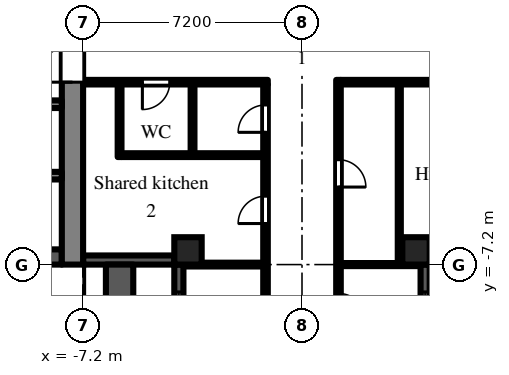
"""IFC4 building model, lengths in metres.
Left out: names, types, materials, properties, quantities, classifications, styles, units other than length and angle.
Written with IfcOpenShell. Run it as: python <this file> out.ifc"""

import sys

from ifc_helpers import new_model, si_unit, direction, frame, frame_2d, origin, origin_2d, place, context, subcontext, project, spatial, rectangle, extrude, element, fill, save


model = new_model("IFC4")
c1 = context("Model", 3, precision=1e-05, world=origin(), true_north=direction((0.0, 1.0)))
c2 = subcontext(c1, "Body", "Model", "MODEL_VIEW")
j1 = project(units=[si_unit("LENGTHUNIT", "METRE"), si_unit("PLANEANGLEUNIT", "RADIAN")], contexts=[c1])
p1 = place(None, origin())
s1 = spatial("IfcSite", under=j1, at=p1, CompositionType="ELEMENT")
p2 = place(p1, origin())
s2 = spatial("IfcBuilding", under=s1, at=p2, CompositionType="ELEMENT")
p3 = place(p2, frame((0.0, 0.0, 35.7)))
s3 = spatial("IfcBuildingStorey", under=s2, at=p3, CompositionType="ELEMENT", Elevation=35.7)
for number, where, z_axis, x_axis in (
    (1, (-3.75, -6.75, 0.0), (0.0, 0.0, 1.0), (1.0, 0.0, 0.0)),
    (2, (3.75, -6.75, 0.0), (0.0, 0.0, 1.0), (1.0, 0.0, 0.0)),
):
    element("IfcColumn", number, at=place(p3, frame(where, z_axis=z_axis, x_axis=x_axis)), inside=s3, PredefinedType="COLUMN", context=c2, shape_type="SweptSolid", body=[
        extrude(rectangle(XDim=0.9, YDim=0.9, at=origin_2d()), origin(), (0.0, 0.0, 1.0), 3.0),
    ])
p4 = place(p3, frame((-7.2, -7.05, 0.0), z_axis=(0.0, 0.0, 1.0), x_axis=(1.0, 0.0, 0.0)))
e3 = element("IfcWall", 3, at=p4, inside=s3, PredefinedType="SOLIDWALL", context=c2, shape_type="SweptSolid", body=[
    extrude(rectangle(XDim=3.0, YDim=0.3, at=frame_2d((1.5, 0.0))), origin(), (0.0, 0.0, 1.0), 2.1),
])
p5 = place(p3, frame((-4.05, -7.2, 0.0), z_axis=(0.0, 0.0, 1.0), x_axis=(0.0, -1.0, 0.0)))
e4 = element("IfcWall", 4, at=p5, inside=s3, PredefinedType="SOLIDWALL", context=c2, shape_type="SweptSolid", body=[
    extrude(rectangle(XDim=7.2, YDim=0.3, at=frame_2d((3.6, 0.0))), origin(), (0.0, 0.0, 1.0), 2.1),
])
p6 = place(p5, frame((3.0, 0.0, 0.0)))
e5 = element("IfcOpeningElement", 5, at=p6, cuts=e4, PredefinedType="OPENING", context=c2, shape_type="SweptSolid", body=[
    extrude(rectangle(XDim=1.2, YDim=2.05, at=frame_2d((0.6, 1.025))), frame((0.0, 0.16, 0.0), z_axis=(0.0, -1.0, 0.0), x_axis=(1.0, 0.0, 0.0)), (0.0, 0.0, 1.0), 0.32),
])
p7 = place(p5, frame((0.9, 0.0, 0.2)))
e6 = element("IfcOpeningElement", 6, at=p7, cuts=e4, PredefinedType="OPENING", context=c2, shape_type="SweptSolid", body=[
    extrude(rectangle(XDim=1.8, YDim=1.85, at=frame_2d((0.9, 0.925))), frame((0.0, 0.16, 0.0), z_axis=(0.0, -1.0, 0.0), x_axis=(1.0, 0.0, 0.0)), (0.0, 0.0, 1.0), 0.32),
])
p8 = place(p5, frame((4.5, 0.0, 0.2)))
e7 = element("IfcOpeningElement", 7, at=p8, cuts=e4, PredefinedType="OPENING", context=c2, shape_type="SweptSolid", body=[
    extrude(rectangle(XDim=1.8, YDim=1.85, at=frame_2d((0.9, 0.925))), frame((0.0, 0.16, 0.0), z_axis=(0.0, -1.0, 0.0), x_axis=(1.0, 0.0, 0.0)), (0.0, 0.0, 1.0), 0.32),
])
p9 = place(p3, frame((4.05, -14.4, 0.0), z_axis=(0.0, 0.0, 1.0), x_axis=(0.0, 1.0, 0.0)))
e8 = element("IfcWall", 8, at=p9, inside=s3, PredefinedType="SOLIDWALL", context=c2, shape_type="SweptSolid", body=[
    extrude(rectangle(XDim=7.2, YDim=0.3, at=frame_2d((3.6, 0.0))), origin(), (0.0, 0.0, 1.0), 2.1),
])
p10 = place(p9, frame((3.0, 0.0, 0.0)))
e9 = element("IfcOpeningElement", 9, at=p10, cuts=e8, PredefinedType="OPENING", context=c2, shape_type="SweptSolid", body=[
    extrude(rectangle(XDim=1.2, YDim=2.05, at=frame_2d((0.6, 1.025))), frame((0.0, 0.16, 0.0), z_axis=(0.0, -1.0, 0.0), x_axis=(1.0, 0.0, 0.0)), (0.0, 0.0, 1.0), 0.32),
])
p11 = place(p9, frame((0.9, 0.0, 0.2)))
e10 = element("IfcOpeningElement", 10, at=p11, cuts=e8, PredefinedType="OPENING", context=c2, shape_type="SweptSolid", body=[
    extrude(rectangle(XDim=1.8, YDim=1.85, at=frame_2d((0.9, 0.925))), frame((0.0, 0.16, 0.0), z_axis=(0.0, -1.0, 0.0), x_axis=(1.0, 0.0, 0.0)), (0.0, 0.0, 1.0), 0.32),
])
p12 = place(p9, frame((4.5, 0.0, 0.2)))
e11 = element("IfcOpeningElement", 11, at=p12, cuts=e8, PredefinedType="OPENING", context=c2, shape_type="SweptSolid", body=[
    extrude(rectangle(XDim=1.8, YDim=1.85, at=frame_2d((0.9, 0.925))), frame((0.0, 0.16, 0.0), z_axis=(0.0, -1.0, 0.0), x_axis=(1.0, 0.0, 0.0)), (0.0, 0.0, 1.0), 0.32),
])
p13 = place(p3, frame((-6.0, -14.4, 0.0), z_axis=(0.0, 0.0, 1.0), x_axis=(0.0, 1.0, 0.0)))
e12 = element("IfcWall", 12, at=p13, inside=s3, PredefinedType="PARAPET", context=c2, shape_type="SweptSolid", body=[
    extrude(rectangle(XDim=7.2, YDim=0.9, at=frame_2d((3.6, 0.0))), origin(), (0.0, 0.0, 1.0), 0.8),
])
p14 = place(p3, frame((-7.55, -7.2, 0.0), z_axis=(0.0, 0.0, 1.0), x_axis=(0.0, 1.0, 0.0)))
e13 = element("IfcWall", 13, at=p14, inside=s3, PredefinedType="SHEAR", context=c2, shape_type="SweptSolid", body=[
    extrude(rectangle(XDim=14.4, YDim=0.7, at=frame_2d((7.2, 0.0))), origin(), (0.0, 0.0, 1.0), 2.575),
])
p15 = place(p14, frame((6.0, 0.0, 0.0)))
e14 = element("IfcOpeningElement", 14, at=p15, cuts=e13, PredefinedType="OPENING", context=c2, shape_type="SweptSolid", body=[
    extrude(rectangle(XDim=2.4, YDim=2.2, at=frame_2d((1.2, 1.1))), frame((0.0, 0.36, 0.0), z_axis=(0.0, -1.0, 0.0), x_axis=(1.0, 0.0, 0.0)), (0.0, 0.0, 1.0), 0.72),
])
p16 = place(p3, frame((-7.9, -6.95, 0.0), z_axis=(0.0, 0.0, 1.0), x_axis=(-1.0, 0.0, 0.0)))
e15 = element("IfcWall", 15, at=p16, inside=s3, PredefinedType="SHEAR", context=c2, shape_type="SweptSolid", body=[
    extrude(rectangle(XDim=12.95, YDim=0.5, at=frame_2d((6.475, 0.0))), origin(), (0.0, 0.0, 1.0), 2.575),
])
p17 = place(p3, frame((-7.9, -1.925, 0.0), z_axis=(0.0, 0.0, 1.0), x_axis=(-1.0, 0.0, 0.0)))
e16 = element("IfcWall", 16, at=p17, inside=s3, PredefinedType="SHEAR", context=c2, shape_type="SweptSolid", body=[
    extrude(rectangle(XDim=12.95, YDim=0.25, at=frame_2d((6.475, 0.0))), origin(), (0.0, 0.0, 1.0), 2.575),
])
p18 = place(p17, frame((4.825, 0.0, 0.0)))
e17 = element("IfcOpeningElement", 17, at=p18, cuts=e16, PredefinedType="OPENING", context=c2, shape_type="SweptSolid", body=[
    extrude(rectangle(XDim=1.1, YDim=2.1, at=frame_2d((0.55, 1.05))), frame((0.0, 0.135, 0.0), z_axis=(0.0, -1.0, 0.0), x_axis=(1.0, 0.0, 0.0)), (0.0, 0.0, 1.0), 0.27),
])
p19 = place(p17, frame((7.025, 0.0, 0.0)))
e18 = element("IfcOpeningElement", 18, at=p19, cuts=e16, PredefinedType="OPENING", context=c2, shape_type="SweptSolid", body=[
    extrude(rectangle(XDim=1.1, YDim=2.1, at=frame_2d((0.55, 1.05))), frame((0.0, 0.135, 0.0), z_axis=(0.0, -1.0, 0.0), x_axis=(1.0, 0.0, 0.0)), (0.0, 0.0, 1.0), 0.27),
])
p20 = place(p17, frame((9.225, 0.0, 0.0)))
e19 = element("IfcOpeningElement", 19, at=p20, cuts=e16, PredefinedType="OPENING", context=c2, shape_type="SweptSolid", body=[
    extrude(rectangle(XDim=1.1, YDim=2.1, at=frame_2d((0.55, 1.05))), frame((0.0, 0.135, 0.0), z_axis=(0.0, -1.0, 0.0), x_axis=(1.0, 0.0, 0.0)), (0.0, 0.0, 1.0), 0.27),
])
p21 = place(p17, frame((0.525, 0.0, 0.0)))
e20 = element("IfcOpeningElement", 20, at=p21, cuts=e16, PredefinedType="OPENING", context=c2, shape_type="SweptSolid", body=[
    extrude(rectangle(XDim=0.9, YDim=2.1, at=frame_2d((0.45, 1.05))), frame((0.0, 0.135, 0.0), z_axis=(0.0, -1.0, 0.0), x_axis=(1.0, 0.0, 0.0)), (0.0, 0.0, 1.0), 0.27),
])
p22 = place(p17, frame((2.625, 0.0, 0.0)))
e21 = element("IfcOpeningElement", 21, at=p22, cuts=e16, PredefinedType="OPENING", context=c2, shape_type="SweptSolid", body=[
    extrude(rectangle(XDim=1.1, YDim=2.1, at=frame_2d((0.55, 1.05))), frame((0.0, 0.135, 0.0), z_axis=(0.0, -1.0, 0.0), x_axis=(1.0, 0.0, 0.0)), (0.0, 0.0, 1.0), 0.27),
])
p23 = place(p3, frame((-7.9, -4.275, 0.0), z_axis=(0.0, 0.0, 1.0), x_axis=(-1.0, 0.0, 0.0)))
e22 = element("IfcWall", 22, at=p23, inside=s3, PredefinedType="SHEAR", context=c2, shape_type="SweptSolid", body=[
    extrude(rectangle(XDim=1.95, YDim=0.25, at=frame_2d((0.975, 0.0))), origin(), (0.0, 0.0, 1.0), 2.575),
])
p24 = place(p3, frame((-7.2, -1.2, 0.0), z_axis=(0.0, 0.0, 1.0), x_axis=(1.0, 0.0, 0.0)))
e23 = element("IfcWall", 23, at=p24, inside=s3, PredefinedType="PARTITIONING", context=c2, shape_type="SweptSolid", body=[
    extrude(rectangle(XDim=6.075, YDim=0.15, at=frame_2d((3.038, 0.0))), origin(), (0.0, 0.0, 1.0), 2.575),
])
p25 = place(p24, frame((1.95, 0.0, 0.0)))
e24 = element("IfcOpeningElement", 24, at=p25, cuts=e23, PredefinedType="OPENING", context=c2, shape_type="SweptSolid", body=[
    extrude(rectangle(XDim=0.9, YDim=2.1, at=frame_2d((0.45, 1.05))), frame((0.0, 0.085, 0.0), z_axis=(0.0, -1.0, 0.0), x_axis=(1.0, 0.0, 0.0)), (0.0, 0.0, 1.0), 0.17),
])
p26 = place(p3, frame((-6.0, -3.663, 0.0), z_axis=(0.0, 0.0, 1.0), x_axis=(0.0, 1.0, 0.0)))
e25 = element("IfcWall", 25, at=p26, inside=s3, PredefinedType="PARTITIONING", context=c2, shape_type="SweptSolid", body=[
    extrude(rectangle(XDim=2.388, YDim=0.125, at=frame_2d((1.194, 0.0))), origin(), (0.0, 0.0, 1.0), 2.575),
])
p27 = place(p3, frame((-5.938, -3.6, 0.0), z_axis=(0.0, 0.0, 1.0), x_axis=(1.0, 0.0, 0.0)))
e26 = element("IfcWall", 26, at=p27, inside=s3, PredefinedType="PARTITIONING", context=c2, shape_type="SweptSolid", body=[
    extrude(rectangle(XDim=4.663, YDim=0.125, at=frame_2d((2.331, 0.0))), origin(), (0.0, 0.0, 1.0), 2.575),
])
p28 = place(p3, frame((-3.9, -7.2, 0.0), z_axis=(0.0, 0.0, 1.0), x_axis=(1.0, 0.0, 0.0)))
e27 = element("IfcWall", 27, at=p28, inside=s3, PredefinedType="PARTITIONING", context=c2, shape_type="SweptSolid", body=[
    extrude(rectangle(XDim=2.625, YDim=0.125, at=frame_2d((1.312, 0.0))), origin(), (0.0, 0.0, 1.0), 2.575),
])
p29 = place(p3, frame((-3.6, -3.538, 0.0), z_axis=(0.0, 0.0, 1.0), x_axis=(0.0, 1.0, 0.0)))
e28 = element("IfcWall", 28, at=p29, inside=s3, PredefinedType="PARTITIONING", context=c2, shape_type="SweptSolid", body=[
    extrude(rectangle(XDim=2.263, YDim=0.125, at=frame_2d((1.131, 0.0))), origin(), (0.0, 0.0, 1.0), 2.575),
])
p30 = place(p3, frame((-1.2, -36.5, 0.0), z_axis=(0.0, 0.0, 1.0), x_axis=(0.0, 1.0, 0.0)))
e29 = element("IfcWall", 29, at=p30, inside=s3, PredefinedType="PARTITIONING", context=c2, shape_type="SweptSolid", body=[
    extrude(rectangle(XDim=35.225, YDim=0.15, at=frame_2d((17.613, 0.0))), origin(), (0.0, 0.0, 1.0), 2.575),
])
p31 = place(p30, frame((33.65, 0.0, 0.0)))
e30 = element("IfcOpeningElement", 30, at=p31, cuts=e29, PredefinedType="OPENING", context=c2, shape_type="SweptSolid", body=[
    extrude(rectangle(XDim=0.9, YDim=2.1, at=frame_2d((0.45, 1.05))), frame((0.0, 0.085, 0.0), z_axis=(0.0, -1.0, 0.0), x_axis=(1.0, 0.0, 0.0)), (0.0, 0.0, 1.0), 0.17),
])
p32 = place(p30, frame((30.65, 0.0, 0.0)))
e31 = element("IfcOpeningElement", 31, at=p32, cuts=e29, PredefinedType="OPENING", context=c2, shape_type="SweptSolid", body=[
    extrude(rectangle(XDim=0.9, YDim=2.1, at=frame_2d((0.45, 1.05))), frame((0.0, 0.085, 0.0), z_axis=(0.0, -1.0, 0.0), x_axis=(1.0, 0.0, 0.0)), (0.0, 0.0, 1.0), 0.17),
])
p33 = place(p30, frame((23.05, 0.0, 0.0)))
e32 = element("IfcOpeningElement", 32, at=p33, cuts=e29, PredefinedType="OPENING", context=c2, shape_type="SweptSolid", body=[
    extrude(rectangle(XDim=0.9, YDim=2.1, at=frame_2d((0.45, 1.05))), frame((0.0, 0.085, 0.0), z_axis=(0.0, -1.0, 0.0), x_axis=(1.0, 0.0, 0.0)), (0.0, 0.0, 1.0), 0.17),
])
p34 = place(p30, frame((26.65, 0.0, 0.0)))
e33 = element("IfcOpeningElement", 33, at=p34, cuts=e29, PredefinedType="OPENING", context=c2, shape_type="SweptSolid", body=[
    extrude(rectangle(XDim=0.9, YDim=2.1, at=frame_2d((0.45, 1.05))), frame((0.0, 0.085, 0.0), z_axis=(0.0, -1.0, 0.0), x_axis=(1.0, 0.0, 0.0)), (0.0, 0.0, 1.0), 0.17),
])
p35 = place(p30, frame((17.3, 0.0, 0.0)))
e34 = element("IfcOpeningElement", 34, at=p35, cuts=e29, PredefinedType="OPENING", context=c2, shape_type="SweptSolid", body=[
    extrude(rectangle(XDim=1.0, YDim=2.1, at=frame_2d((0.5, 1.05))), frame((0.0, 0.085, 0.0), z_axis=(0.0, -1.0, 0.0), x_axis=(1.0, 0.0, 0.0)), (0.0, 0.0, 1.0), 0.17),
])
p36 = place(p30, frame((12.65, 0.0, 0.0)))
e35 = element("IfcOpeningElement", 35, at=p36, cuts=e29, PredefinedType="OPENING", context=c2, shape_type="SweptSolid", body=[
    extrude(rectangle(XDim=0.9, YDim=2.1, at=frame_2d((0.45, 1.05))), frame((0.0, 0.085, 0.0), z_axis=(0.0, -1.0, 0.0), x_axis=(1.0, 0.0, 0.0)), (0.0, 0.0, 1.0), 0.17),
])
p37 = place(p30, frame((10.1, 0.0, 0.0)))
e36 = element("IfcOpeningElement", 36, at=p37, cuts=e29, PredefinedType="OPENING", context=c2, shape_type="SweptSolid", body=[
    extrude(rectangle(XDim=1.0, YDim=2.1, at=frame_2d((0.5, 1.05))), frame((0.0, 0.085, 0.0), z_axis=(0.0, -1.0, 0.0), x_axis=(1.0, 0.0, 0.0)), (0.0, 0.0, 1.0), 0.17),
])
p38 = place(p30, frame((6.35, 0.0, 0.0)))
e37 = element("IfcOpeningElement", 37, at=p38, cuts=e29, PredefinedType="OPENING", context=c2, shape_type="SweptSolid", body=[
    extrude(rectangle(XDim=0.9, YDim=2.1, at=frame_2d((0.45, 1.05))), frame((0.0, 0.085, 0.0), z_axis=(0.0, -1.0, 0.0), x_axis=(1.0, 0.0, 0.0)), (0.0, 0.0, 1.0), 0.17),
])
p39 = place(p30, frame((4.55, 0.0, 0.0)))
e38 = element("IfcOpeningElement", 38, at=p39, cuts=e29, PredefinedType="OPENING", context=c2, shape_type="SweptSolid", body=[
    extrude(rectangle(XDim=0.9, YDim=2.1, at=frame_2d((0.45, 1.05))), frame((0.0, 0.085, 0.0), z_axis=(0.0, -1.0, 0.0), x_axis=(1.0, 0.0, 0.0)), (0.0, 0.0, 1.0), 0.17),
])
p40 = place(p30, frame((1.15, 0.0, 0.0)))
e39 = element("IfcOpeningElement", 39, at=p40, cuts=e29, PredefinedType="OPENING", context=c2, shape_type="SweptSolid", body=[
    extrude(rectangle(XDim=1.8, YDim=2.1, at=frame_2d((0.9, 1.05))), frame((0.0, 0.085, 0.0), z_axis=(0.0, -1.0, 0.0), x_axis=(1.0, 0.0, 0.0)), (0.0, 0.0, 1.0), 0.17),
])
p41 = place(p3, frame((1.2, -36.5, 0.0), z_axis=(0.0, 0.0, 1.0), x_axis=(0.0, 1.0, 0.0)))
e40 = element("IfcWall", 40, at=p41, inside=s3, PredefinedType="PARTITIONING", context=c2, shape_type="SweptSolid", body=[
    extrude(rectangle(XDim=35.375, YDim=0.15, at=frame_2d((17.688, 0.0))), origin(), (0.0, 0.0, 1.0), 2.575),
])
p42 = place(p41, frame((31.85, 0.0, 0.0)))
e41 = element("IfcOpeningElement", 41, at=p42, cuts=e40, PredefinedType="OPENING", context=c2, shape_type="SweptSolid", body=[
    extrude(rectangle(XDim=0.9, YDim=2.1, at=frame_2d((0.45, 1.05))), frame((0.0, 0.085, 0.0), z_axis=(0.0, -1.0, 0.0), x_axis=(1.0, 0.0, 0.0)), (0.0, 0.0, 1.0), 0.17),
])
p43 = place(p41, frame((27.45, 0.0, 0.0)))
e42 = element("IfcOpeningElement", 42, at=p43, cuts=e40, PredefinedType="OPENING", context=c2, shape_type="SweptSolid", body=[
    extrude(rectangle(XDim=0.9, YDim=2.1, at=frame_2d((0.45, 1.05))), frame((0.0, 0.085, 0.0), z_axis=(0.0, -1.0, 0.0), x_axis=(1.0, 0.0, 0.0)), (0.0, 0.0, 1.0), 0.17),
])
p44 = place(p41, frame((23.85, 0.0, 0.0)))
e43 = element("IfcOpeningElement", 43, at=p44, cuts=e40, PredefinedType="OPENING", context=c2, shape_type="SweptSolid", body=[
    extrude(rectangle(XDim=0.9, YDim=2.1, at=frame_2d((0.45, 1.05))), frame((0.0, 0.085, 0.0), z_axis=(0.0, -1.0, 0.0), x_axis=(1.0, 0.0, 0.0)), (0.0, 0.0, 1.0), 0.17),
])
p45 = place(p41, frame((15.1, 0.0, 0.0)))
e44 = element("IfcOpeningElement", 44, at=p45, cuts=e40, PredefinedType="OPENING", context=c2, shape_type="SweptSolid", body=[
    extrude(rectangle(XDim=1.0, YDim=2.1, at=frame_2d((0.5, 1.05))), frame((0.0, 0.085, 0.0), z_axis=(0.0, -1.0, 0.0), x_axis=(1.0, 0.0, 0.0)), (0.0, 0.0, 1.0), 0.17),
])
p46 = place(p41, frame((8.01, 0.0, 0.0)))
e45 = element("IfcOpeningElement", 45, at=p46, cuts=e40, PredefinedType="OPENING", context=c2, shape_type="SweptSolid", body=[
    extrude(rectangle(XDim=1.0, YDim=2.1, at=frame_2d((0.5, 1.05))), frame((0.0, 0.085, 0.0), z_axis=(0.0, -1.0, 0.0), x_axis=(1.0, 0.0, 0.0)), (0.0, 0.0, 1.0), 0.17),
])
p47 = place(p41, frame((6.35, 0.0, 0.0)))
e46 = element("IfcOpeningElement", 46, at=p47, cuts=e40, PredefinedType="OPENING", context=c2, shape_type="SweptSolid", body=[
    extrude(rectangle(XDim=0.9, YDim=2.1, at=frame_2d((0.45, 1.05))), frame((0.0, 0.085, 0.0), z_axis=(0.0, -1.0, 0.0), x_axis=(1.0, 0.0, 0.0)), (0.0, 0.0, 1.0), 0.17),
])
p48 = place(p41, frame((4.55, 0.0, 0.0)))
e47 = element("IfcOpeningElement", 47, at=p48, cuts=e40, PredefinedType="OPENING", context=c2, shape_type="SweptSolid", body=[
    extrude(rectangle(XDim=0.9, YDim=2.1, at=frame_2d((0.45, 1.05))), frame((0.0, 0.085, 0.0), z_axis=(0.0, -1.0, 0.0), x_axis=(1.0, 0.0, 0.0)), (0.0, 0.0, 1.0), 0.17),
])
p49 = place(p41, frame((1.15, 0.0, 0.0)))
e48 = element("IfcOpeningElement", 48, at=p49, cuts=e40, PredefinedType="OPENING", context=c2, shape_type="SweptSolid", body=[
    extrude(rectangle(XDim=1.8, YDim=2.1, at=frame_2d((0.9, 1.05))), frame((0.0, 0.085, 0.0), z_axis=(0.0, -1.0, 0.0), x_axis=(1.0, 0.0, 0.0)), (0.0, 0.0, 1.0), 0.17),
])
p50 = place(p3, frame((1.275, -7.2, 0.0), z_axis=(0.0, 0.0, 1.0), x_axis=(1.0, 0.0, 0.0)))
e49 = element("IfcWall", 49, at=p50, inside=s3, PredefinedType="PARTITIONING", context=c2, shape_type="SweptSolid", body=[
    extrude(rectangle(XDim=2.625, YDim=0.1, at=frame_2d((1.312, 0.0))), origin(), (0.0, 0.0, 1.0), 2.575),
])
p51 = place(p3, frame((1.275, -1.2, 0.0), z_axis=(0.0, 0.0, 1.0), x_axis=(1.0, 0.0, 0.0)))
e50 = element("IfcWall", 50, at=p51, inside=s3, PredefinedType="PARTITIONING", context=c2, shape_type="SweptSolid", body=[
    extrude(rectangle(XDim=5.925, YDim=0.15, at=frame_2d((2.962, 0.0))), origin(), (0.0, 0.0, 1.0), 2.575),
])
p52 = place(p51, frame((3.475, 0.0, 0.0)))
e51 = element("IfcOpeningElement", 51, at=p52, cuts=e50, PredefinedType="OPENING", context=c2, shape_type="SweptSolid", body=[
    extrude(rectangle(XDim=0.9, YDim=2.1, at=frame_2d((0.45, 1.05))), frame((0.0, 0.085, 0.0), z_axis=(0.0, -1.0, 0.0), x_axis=(1.0, 0.0, 0.0)), (0.0, 0.0, 1.0), 0.17),
])
p53 = place(p3, frame((3.2, -7.15, 0.0), z_axis=(0.0, 0.0, 1.0), x_axis=(0.0, 1.0, 0.0)))
e52 = element("IfcWall", 52, at=p53, inside=s3, PredefinedType="PARTITIONING", context=c2, shape_type="SweptSolid", body=[
    extrude(rectangle(XDim=5.875, YDim=0.1, at=frame_2d((2.938, 0.0))), origin(), (0.0, 0.0, 1.0), 2.575),
])
p54 = place(p7, origin())
e53 = element("IfcWindow", 53, at=p54, inside=s3, PartitioningType="SINGLE_PANEL", PredefinedType="WINDOW", context=c2, shape_type="SweptSolid", body=[
    extrude(rectangle(XDim=1.8, YDim=1.85, at=frame_2d((0.9, 0.925))), frame((0.0, 0.03, 0.0), z_axis=(0.0, -1.0, 0.0), x_axis=(1.0, 0.0, 0.0)), (0.0, 0.0, 1.0), 0.06),
])
fill(e6, e53)
p55 = place(p12, origin())
e54 = element("IfcWindow", 54, at=p55, inside=s3, PartitioningType="SINGLE_PANEL", PredefinedType="WINDOW", context=c2, shape_type="SweptSolid", body=[
    extrude(rectangle(XDim=1.8, YDim=1.85, at=frame_2d((0.9, 0.925))), frame((0.0, 0.03, 0.0), z_axis=(0.0, -1.0, 0.0), x_axis=(1.0, 0.0, 0.0)), (0.0, 0.0, 1.0), 0.06),
])
fill(e11, e54)
p56 = place(p15, origin())
e55 = element("IfcDoor", 55, at=p56, inside=s3, OperationType="DOUBLE_DOOR_DOUBLE_SWING", PredefinedType="DOOR", context=c2, shape_type="SweptSolid", body=[
    extrude(rectangle(XDim=2.4, YDim=2.2, at=frame_2d((1.2, 1.1))), frame((0.0, 0.025, 0.0), z_axis=(0.0, -1.0, 0.0), x_axis=(1.0, 0.0, 0.0)), (0.0, 0.0, 1.0), 0.05),
])
fill(e14, e55)
p57 = place(p42, frame((0.9, 0.0, 0.0), z_axis=(0.0, 0.0, 1.0), x_axis=(-1.0, 0.0, 0.0)))
e56 = element("IfcDoor", 56, at=p57, inside=s3, OperationType="SINGLE_SWING_RIGHT", PredefinedType="DOOR", context=c2, shape_type="SweptSolid", body=[
    extrude(rectangle(XDim=0.9, YDim=2.1, at=frame_2d((0.45, 1.05))), frame((0.0, 0.025, 0.0), z_axis=(0.0, -1.0, 0.0), x_axis=(1.0, 0.0, 0.0)), (0.0, 0.0, 1.0), 0.05),
])
fill(e41, e56)
p58 = place(p31, origin())
e57 = element("IfcDoor", 57, at=p58, inside=s3, OperationType="SINGLE_SWING_LEFT", PredefinedType="DOOR", context=c2, shape_type="SweptSolid", body=[
    extrude(rectangle(XDim=0.9, YDim=2.1, at=frame_2d((0.45, 1.05))), frame((0.0, 0.025, 0.0), z_axis=(0.0, -1.0, 0.0), x_axis=(1.0, 0.0, 0.0)), (0.0, 0.0, 1.0), 0.05),
])
fill(e30, e57)
p59 = place(p25, frame((0.9, 0.0, 0.0), z_axis=(0.0, 0.0, 1.0), x_axis=(-1.0, 0.0, 0.0)))
e58 = element("IfcDoor", 58, at=p59, inside=s3, OperationType="SINGLE_SWING_RIGHT", PredefinedType="DOOR", context=c2, shape_type="SweptSolid", body=[
    extrude(rectangle(XDim=0.9, YDim=2.1, at=frame_2d((0.45, 1.05))), frame((0.0, 0.025, 0.0), z_axis=(0.0, -1.0, 0.0), x_axis=(1.0, 0.0, 0.0)), (0.0, 0.0, 1.0), 0.05),
])
fill(e24, e58)
p60 = place(p32, origin())
e59 = element("IfcDoor", 59, at=p60, inside=s3, OperationType="SINGLE_SWING_LEFT", PredefinedType="DOOR", context=c2, shape_type="SweptSolid", body=[
    extrude(rectangle(XDim=0.9, YDim=2.1, at=frame_2d((0.45, 1.05))), frame((0.0, 0.025, 0.0), z_axis=(0.0, -1.0, 0.0), x_axis=(1.0, 0.0, 0.0)), (0.0, 0.0, 1.0), 0.05),
])
fill(e31, e59)
p61 = place(p43, frame((0.9, 0.0, 0.0), z_axis=(0.0, 0.0, 1.0), x_axis=(-1.0, 0.0, 0.0)))
e60 = element("IfcDoor", 60, at=p61, inside=s3, OperationType="SINGLE_SWING_RIGHT", PredefinedType="DOOR", context=c2, shape_type="SweptSolid", body=[
    extrude(rectangle(XDim=0.9, YDim=2.1, at=frame_2d((0.45, 1.05))), frame((0.0, 0.025, 0.0), z_axis=(0.0, -1.0, 0.0), x_axis=(1.0, 0.0, 0.0)), (0.0, 0.0, 1.0), 0.05),
])
fill(e42, e60)
save(model, sys.argv[1])
